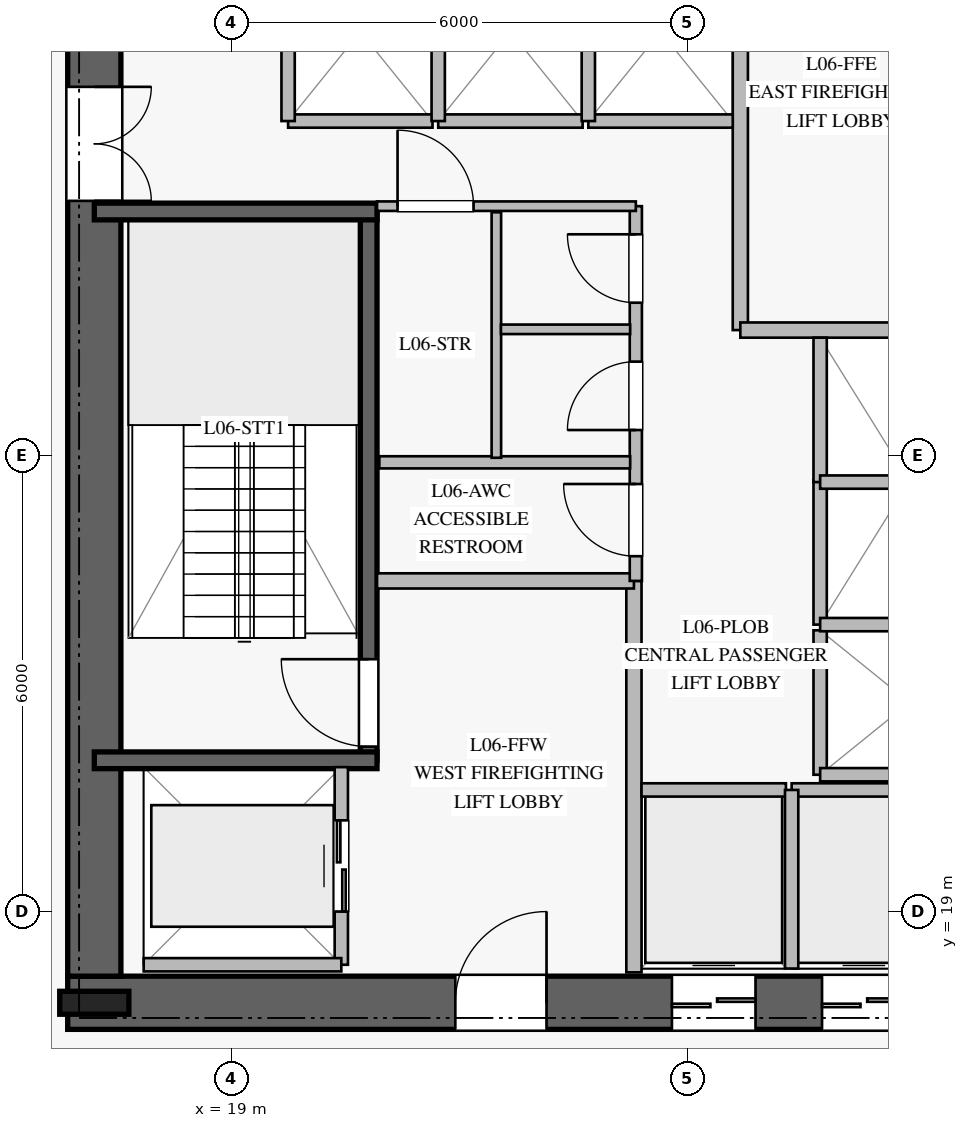
"""IFC4 building model, lengths in metres.
Left out: names, types, materials, properties, quantities, classifications, styles, units other than length and angle.
Written with IfcOpenShell. Run it as: python <this file> out.ifc"""

import sys

from ifc_helpers import new_model, si_unit, direction, frame, frame_2d, origin, origin_2d, place, context, subcontext, project, spatial, rectangle, i_section, extrude, element, fill, save


model = new_model("IFC4")
c1 = context("Model", 3, precision=1e-05, world=origin(), true_north=direction((0.0, 1.0)))
c2 = subcontext(c1, "Body", "Model", "MODEL_VIEW")
j1 = project(units=[si_unit("LENGTHUNIT", "METRE"), si_unit("PLANEANGLEUNIT", "RADIAN")], contexts=[c1])
p1 = place(None, origin())
s1 = spatial("IfcSite", under=j1, at=p1, CompositionType="ELEMENT")
p2 = place(p1, origin())
s2 = spatial("IfcBuilding", under=s1, at=p2, CompositionType="ELEMENT")
p3 = place(p2, frame((0.0, 0.0, 28.0)))
s3 = spatial("IfcBuildingStorey", under=s2, at=p3, CompositionType="ELEMENT", Elevation=28.0)
p4 = place(p3, frame((16.85, 17.8, 0.0), z_axis=(0.0, 0.0, 1.0), x_axis=(1.0, 0.0, 0.0)))
e1 = element("IfcWall", 1, at=p4, inside=s3, PredefinedType="SHEAR", context=c2, shape_type="SweptSolid", body=[
    extrude(rectangle(XDim=16.3, YDim=0.7, at=frame_2d((8.15, 0.0))), origin(), (0.0, 0.0, 1.0), 3.76),
])
p5 = place(p4, frame((5.1, 0.0, 0.0)))
e2 = element("IfcOpeningElement", 2, at=p5, cuts=e1, PredefinedType="OPENING", context=c2, shape_type="SweptSolid", body=[
    extrude(rectangle(XDim=1.2, YDim=2.25, at=frame_2d((0.6, 1.125))), frame((0.0, 0.36, 0.0), z_axis=(0.0, -1.0, 0.0), x_axis=(1.0, 0.0, 0.0)), (0.0, 0.0, 1.0), 0.72),
])
p6 = place(p4, frame((14.05, 0.0, 0.0)))
e3 = element("IfcOpeningElement", 3, at=p6, cuts=e1, PredefinedType="OPENING", context=c2, shape_type="SweptSolid", body=[
    extrude(rectangle(XDim=0.9, YDim=2.1, at=frame_2d((0.45, 1.05))), frame((0.0, 0.36, 0.0), z_axis=(0.0, -1.0, 0.0), x_axis=(1.0, 0.0, 0.0)), (0.0, 0.0, 1.0), 0.72),
])
p7 = place(p4, frame((7.95, 0.0, 0.0)))
e4 = element("IfcOpeningElement", 4, at=p7, cuts=e1, PredefinedType="OPENING", context=c2, shape_type="SweptSolid", body=[
    extrude(rectangle(XDim=1.1, YDim=2.2, at=frame_2d((0.55, 1.1))), frame((0.0, 0.36, 0.0), z_axis=(0.0, -1.0, 0.0), x_axis=(1.0, 0.0, 0.0)), (0.0, 0.0, 1.0), 0.72),
])
p8 = place(p4, frame((9.925, 0.0, 0.0)))
e5 = element("IfcOpeningElement", 5, at=p8, cuts=e1, PredefinedType="OPENING", context=c2, shape_type="SweptSolid", body=[
    extrude(rectangle(XDim=1.1, YDim=2.2, at=frame_2d((0.55, 1.1))), frame((0.0, 0.36, 0.0), z_axis=(0.0, -1.0, 0.0), x_axis=(1.0, 0.0, 0.0)), (0.0, 0.0, 1.0), 0.72),
])
p9 = place(p4, frame((11.9, 0.0, 0.0)))
e6 = element("IfcOpeningElement", 6, at=p9, cuts=e1, PredefinedType="OPENING", context=c2, shape_type="SweptSolid", body=[
    extrude(rectangle(XDim=1.1, YDim=2.2, at=frame_2d((0.55, 1.1))), frame((0.0, 0.36, 0.0), z_axis=(0.0, -1.0, 0.0), x_axis=(1.0, 0.0, 0.0)), (0.0, 0.0, 1.0), 0.72),
])
p10 = place(p3, frame((17.2, 31.85, 0.0), z_axis=(0.0, 0.0, 1.0), x_axis=(0.0, -1.0, 0.0)))
e7 = element("IfcWall", 7, at=p10, inside=s3, PredefinedType="SHEAR", context=c2, shape_type="SweptSolid", body=[
    extrude(rectangle(XDim=13.7, YDim=0.7, at=frame_2d((6.85, 0.0))), origin(), (0.0, 0.0, 1.0), 3.76),
])
p11 = place(p10, frame((2.0, 0.0, 0.0)))
e8 = element("IfcOpeningElement", 8, at=p11, cuts=e7, PredefinedType="OPENING", context=c2, shape_type="SweptSolid", body=[
    extrude(rectangle(XDim=1.5, YDim=2.2, at=frame_2d((0.75, 1.1))), frame((0.0, 0.36, 0.0), z_axis=(0.0, -1.0, 0.0), x_axis=(1.0, 0.0, 0.0)), (0.0, 0.0, 1.0), 0.72),
])
p12 = place(p3, frame((17.2, 17.8, 0.0), z_axis=(0.0, 0.0, 1.0), x_axis=(1.0, 0.0, 0.0)))
e9 = element("IfcColumn", 9, at=p12, inside=s3, PredefinedType="COLUMN", context=c2, shape_type="SweptSolid", body=[
    extrude(i_section(OverallWidth=0.302, OverallDepth=0.91, WebThickness=0.021, FlangeThickness=0.04, at=origin_2d()), origin(), (0.0, 0.0, 1.0), 4.0),
])
p13 = place(p3, frame((20.81, 20.99, 0.0), z_axis=(0.0, 0.0, 1.0), x_axis=(0.0, 1.0, 0.0)))
e10 = element("IfcWall", 10, at=p13, inside=s3, PredefinedType="SOLIDWALL", context=c2, shape_type="SweptSolid", body=[
    extrude(rectangle(XDim=7.22, YDim=0.22, at=frame_2d((3.61, 0.0))), origin(), (0.0, 0.0, 1.0), 3.76),
])
p14 = place(p13, frame((0.18, 0.0, 0.0)))
e11 = element("IfcOpeningElement", 11, at=p14, cuts=e10, PredefinedType="OPENING", context=c2, shape_type="SweptSolid", body=[
    extrude(rectangle(XDim=1.15, YDim=2.2, at=frame_2d((0.575, 1.1))), frame((0.0, 0.12, 0.0), z_axis=(0.0, -1.0, 0.0), x_axis=(1.0, 0.0, 0.0)), (0.0, 0.0, 1.0), 0.24),
])
for number, where, z_axis, x_axis in (
    (12, (17.2, 20.99, 0.0), (0.0, 0.0, 1.0), (1.0, 0.0, 0.0)),
    (13, (17.2, 28.21, 0.0), (0.0, 0.0, 1.0), (1.0, 0.0, 0.0)),
):
    element("IfcWall", number, at=place(p3, frame(where, z_axis=z_axis, x_axis=x_axis)), inside=s3, PredefinedType="SOLIDWALL", context=c2, shape_type="SweptSolid", body=[
        extrude(rectangle(XDim=3.72, YDim=0.22, at=frame_2d((1.86, 0.0))), origin(), (0.0, 0.0, 1.0), 3.76),
    ])
p15 = place(p3, frame((24.3, 18.2, 0.0), z_axis=(0.0, 0.0, 1.0), x_axis=(0.0, 1.0, 0.0)))
e14 = element("IfcWall", 14, at=p15, inside=s3, PredefinedType="PARTITIONING", context=c2, shape_type="SweptSolid", body=[
    extrude(rectangle(XDim=5.15, YDim=0.2, at=frame_2d((2.575, 0.0))), origin(), (0.0, 0.0, 1.0), 3.76),
])
p16 = place(p3, frame((20.92, 23.35, 0.0), z_axis=(0.0, 0.0, 1.0), x_axis=(1.0, 0.0, 0.0)))
e15 = element("IfcWall", 15, at=p16, inside=s3, PredefinedType="PARTITIONING", context=c2, shape_type="SweptSolid", body=[
    extrude(rectangle(XDim=3.38, YDim=0.2, at=frame_2d((1.69, 0.0))), origin(), (0.0, 0.0, 1.0), 3.76),
])
p17 = place(p3, frame((25.7, 26.65, 0.0), z_axis=(0.0, 0.0, 1.0), x_axis=(0.0, 1.0, 0.0)))
e16 = element("IfcWall", 16, at=p17, inside=s3, PredefinedType="PARTITIONING", context=c2, shape_type="SweptSolid", body=[
    extrude(rectangle(XDim=5.15, YDim=0.2, at=frame_2d((2.575, 0.0))), origin(), (0.0, 0.0, 1.0), 3.76),
])
p18 = place(p3, frame((25.7, 26.65, 0.0), z_axis=(0.0, 0.0, 1.0), x_axis=(1.0, 0.0, 0.0)))
e17 = element("IfcWall", 17, at=p18, inside=s3, PredefinedType="PARTITIONING", context=c2, shape_type="SweptSolid", body=[
    extrude(rectangle(XDim=3.38, YDim=0.2, at=frame_2d((1.69, 0.0))), origin(), (0.0, 0.0, 1.0), 3.76),
])
p19 = place(p3, frame((24.325, 23.35, 0.0), z_axis=(0.0, 0.0, 1.0), x_axis=(0.0, 1.0, 0.0)))
e18 = element("IfcWall", 18, at=p19, inside=s3, PredefinedType="PLUMBINGWALL", context=c2, shape_type="SweptSolid", body=[
    extrude(rectangle(XDim=4.93, YDim=0.16, at=frame_2d((2.465, 0.0))), origin(), (0.0, 0.0, 1.0), 3.76),
])
p20 = place(p19, frame((0.325, 0.0, 0.0)))
e19 = element("IfcOpeningElement", 19, at=p20, cuts=e18, PredefinedType="OPENING", context=c2, shape_type="SweptSolid", body=[
    extrude(rectangle(XDim=0.95, YDim=2.1, at=frame_2d((0.475, 1.05))), frame((0.0, 0.09, 0.0), z_axis=(0.0, -1.0, 0.0), x_axis=(1.0, 0.0, 0.0)), (0.0, 0.0, 1.0), 0.18),
])
p21 = place(p19, frame((1.985, 0.0, 0.0)))
e20 = element("IfcOpeningElement", 20, at=p21, cuts=e18, PredefinedType="OPENING", context=c2, shape_type="SweptSolid", body=[
    extrude(rectangle(XDim=0.9, YDim=2.1, at=frame_2d((0.45, 1.05))), frame((0.0, 0.09, 0.0), z_axis=(0.0, -1.0, 0.0), x_axis=(1.0, 0.0, 0.0)), (0.0, 0.0, 1.0), 0.18),
])
p22 = place(p19, frame((3.66, 0.0, 0.0)))
e21 = element("IfcOpeningElement", 21, at=p22, cuts=e18, PredefinedType="OPENING", context=c2, shape_type="SweptSolid", body=[
    extrude(rectangle(XDim=0.9, YDim=2.1, at=frame_2d((0.45, 1.05))), frame((0.0, 0.09, 0.0), z_axis=(0.0, -1.0, 0.0), x_axis=(1.0, 0.0, 0.0)), (0.0, 0.0, 1.0), 0.18),
])
p23 = place(p3, frame((20.92, 28.28, 0.0), z_axis=(0.0, 0.0, 1.0), x_axis=(1.0, 0.0, 0.0)))
e22 = element("IfcWall", 22, at=p23, inside=s3, PredefinedType="PARTITIONING", context=c2, shape_type="SweptSolid", body=[
    extrude(rectangle(XDim=3.405, YDim=0.125, at=frame_2d((1.703, 0.0))), origin(), (0.0, 0.0, 1.0), 3.76),
])
p24 = place(p23, frame((0.27, 0.0, 0.0)))
e23 = element("IfcOpeningElement", 23, at=p24, cuts=e22, PredefinedType="OPENING", context=c2, shape_type="SweptSolid", body=[
    extrude(rectangle(XDim=1.0, YDim=2.15, at=frame_2d((0.5, 1.075))), frame((0.0, 0.073, 0.0), z_axis=(0.0, -1.0, 0.0), x_axis=(1.0, 0.0, 0.0)), (0.0, 0.0, 1.0), 0.145),
])
p25 = place(p3, frame((20.95, 24.91, 0.0), z_axis=(0.0, 0.0, 1.0), x_axis=(1.0, 0.0, 0.0)))
e24 = element("IfcWall", 24, at=p25, inside=s3, PredefinedType="PLUMBINGWALL", context=c2, shape_type="SweptSolid", body=[
    extrude(rectangle(XDim=3.3, YDim=0.16, at=frame_2d((1.65, 0.0))), origin(), (0.0, 0.0, 1.0), 3.76),
])
p26 = place(p3, frame((22.49, 24.97, 0.0), z_axis=(0.0, 0.0, 1.0), x_axis=(0.0, 1.0, 0.0)))
e25 = element("IfcWall", 25, at=p26, inside=s3, PredefinedType="PARTITIONING", context=c2, shape_type="SweptSolid", body=[
    extrude(rectangle(XDim=3.23, YDim=0.125, at=frame_2d((1.615, 0.0))), origin(), (0.0, 0.0, 1.0), 3.76),
])
p27 = place(p3, frame((22.55, 26.66, 0.0), z_axis=(0.0, 0.0, 1.0), x_axis=(1.0, 0.0, 0.0)))
e26 = element("IfcWall", 26, at=p27, inside=s3, PredefinedType="PARTITIONING", context=c2, shape_type="SweptSolid", body=[
    extrude(rectangle(XDim=1.7, YDim=0.125, at=frame_2d((0.85, 0.0))), origin(), (0.0, 0.0, 1.0), 3.76),
])
p28 = place(p3, frame((24.4, 20.6, 0.0), z_axis=(0.0, 0.0, 1.0), x_axis=(1.0, 0.0, 0.0)))
e27 = element("IfcWall", 27, at=p28, inside=s3, PredefinedType="PARTITIONING", context=c2, shape_type="SweptSolid", body=[
    extrude(rectangle(XDim=1.9, YDim=0.175, at=frame_2d((0.95, 0.0))), origin(), (0.0, 0.0, 1.0), 3.76),
])
p29 = place(p3, frame((26.375, 20.6, 0.0), z_axis=(0.0, 0.0, 1.0), x_axis=(1.0, 0.0, 0.0)))
e28 = element("IfcWall", 28, at=p29, inside=s3, PredefinedType="PARTITIONING", context=c2, shape_type="SweptSolid", body=[
    extrude(rectangle(XDim=1.9, YDim=0.175, at=frame_2d((0.95, 0.0))), origin(), (0.0, 0.0, 1.0), 3.76),
])
p30 = place(p3, frame((26.375, 18.25, 0.0), z_axis=(0.0, 0.0, 1.0), x_axis=(0.0, 1.0, 0.0)))
e29 = element("IfcWall", 29, at=p30, inside=s3, PredefinedType="PARTITIONING", context=c2, shape_type="SweptSolid", body=[
    extrude(rectangle(XDim=2.35, YDim=0.175, at=frame_2d((1.175, 0.0))), origin(), (0.0, 0.0, 1.0), 3.76),
])
p31 = place(p3, frame((19.75, 29.4, 0.0), z_axis=(0.0, 0.0, 1.0), x_axis=(1.0, 0.0, 0.0)))
e30 = element("IfcWall", 30, at=p31, inside=s3, PredefinedType="PARTITIONING", context=c2, shape_type="SweptSolid", body=[
    extrude(rectangle(XDim=1.9, YDim=0.175, at=frame_2d((0.95, 0.0))), origin(), (0.0, 0.0, 1.0), 3.76),
])
p32 = place(p3, frame((19.75, 29.4, 0.0), z_axis=(0.0, 0.0, 1.0), x_axis=(0.0, 1.0, 0.0)))
e31 = element("IfcWall", 31, at=p32, inside=s3, PredefinedType="PARTITIONING", context=c2, shape_type="SweptSolid", body=[
    extrude(rectangle(XDim=2.35, YDim=0.175, at=frame_2d((1.175, 0.0))), origin(), (0.0, 0.0, 1.0), 3.76),
])
p33 = place(p3, frame((21.725, 29.4, 0.0), z_axis=(0.0, 0.0, 1.0), x_axis=(1.0, 0.0, 0.0)))
e32 = element("IfcWall", 32, at=p33, inside=s3, PredefinedType="PARTITIONING", context=c2, shape_type="SweptSolid", body=[
    extrude(rectangle(XDim=1.9, YDim=0.175, at=frame_2d((0.95, 0.0))), origin(), (0.0, 0.0, 1.0), 3.76),
])
p34 = place(p3, frame((21.725, 29.4, 0.0), z_axis=(0.0, 0.0, 1.0), x_axis=(0.0, 1.0, 0.0)))
e33 = element("IfcWall", 33, at=p34, inside=s3, PredefinedType="PARTITIONING", context=c2, shape_type="SweptSolid", body=[
    extrude(rectangle(XDim=2.35, YDim=0.175, at=frame_2d((1.175, 0.0))), origin(), (0.0, 0.0, 1.0), 3.76),
])
p35 = place(p3, frame((23.7, 29.4, 0.0), z_axis=(0.0, 0.0, 1.0), x_axis=(1.0, 0.0, 0.0)))
e34 = element("IfcWall", 34, at=p35, inside=s3, PredefinedType="PARTITIONING", context=c2, shape_type="SweptSolid", body=[
    extrude(rectangle(XDim=1.9, YDim=0.175, at=frame_2d((0.95, 0.0))), origin(), (0.0, 0.0, 1.0), 3.76),
])
p36 = place(p3, frame((23.7, 29.4, 0.0), z_axis=(0.0, 0.0, 1.0), x_axis=(0.0, 1.0, 0.0)))
e35 = element("IfcWall", 35, at=p36, inside=s3, PredefinedType="PARTITIONING", context=c2, shape_type="SweptSolid", body=[
    extrude(rectangle(XDim=2.35, YDim=0.175, at=frame_2d((1.175, 0.0))), origin(), (0.0, 0.0, 1.0), 3.76),
])
p37 = place(p3, frame((26.75, 20.8, 0.0), z_axis=(0.0, 0.0, 1.0), x_axis=(0.0, 1.0, 0.0)))
e36 = element("IfcWall", 36, at=p37, inside=s3, PredefinedType="PARTITIONING", context=c2, shape_type="SweptSolid", body=[
    extrude(rectangle(XDim=1.9, YDim=0.175, at=frame_2d((0.95, 0.0))), origin(), (0.0, 0.0, 1.0), 3.76),
])
p38 = place(p3, frame((26.75, 20.8, 0.0), z_axis=(0.0, 0.0, 1.0), x_axis=(1.0, 0.0, 0.0)))
e37 = element("IfcWall", 37, at=p38, inside=s3, PredefinedType="PARTITIONING", context=c2, shape_type="SweptSolid", body=[
    extrude(rectangle(XDim=2.35, YDim=0.175, at=frame_2d((1.175, 0.0))), origin(), (0.0, 0.0, 1.0), 3.76),
])
p39 = place(p3, frame((26.75, 22.775, 0.0), z_axis=(0.0, 0.0, 1.0), x_axis=(0.0, 1.0, 0.0)))
e38 = element("IfcWall", 38, at=p39, inside=s3, PredefinedType="PARTITIONING", context=c2, shape_type="SweptSolid", body=[
    extrude(rectangle(XDim=1.9, YDim=0.175, at=frame_2d((0.95, 0.0))), origin(), (0.0, 0.0, 1.0), 3.76),
])
p40 = place(p3, frame((26.75, 22.775, 0.0), z_axis=(0.0, 0.0, 1.0), x_axis=(1.0, 0.0, 0.0)))
e39 = element("IfcWall", 39, at=p40, inside=s3, PredefinedType="PARTITIONING", context=c2, shape_type="SweptSolid", body=[
    extrude(rectangle(XDim=2.35, YDim=0.175, at=frame_2d((1.175, 0.0))), origin(), (0.0, 0.0, 1.0), 3.76),
])
p41 = place(p3, frame((26.75, 24.65, 0.0), z_axis=(0.0, 0.0, 1.0), x_axis=(0.0, 1.0, 0.0)))
e40 = element("IfcWall", 40, at=p41, inside=s3, PredefinedType="PARTITIONING", context=c2, shape_type="SweptSolid", body=[
    extrude(rectangle(XDim=1.9, YDim=0.175, at=frame_2d((0.95, 0.0))), origin(), (0.0, 0.0, 1.0), 3.76),
])
p42 = place(p3, frame((26.75, 24.65, 0.0), z_axis=(0.0, 0.0, 1.0), x_axis=(1.0, 0.0, 0.0)))
e41 = element("IfcWall", 41, at=p42, inside=s3, PredefinedType="PARTITIONING", context=c2, shape_type="SweptSolid", body=[
    extrude(rectangle(XDim=2.35, YDim=0.175, at=frame_2d((1.175, 0.0))), origin(), (0.0, 0.0, 1.0), 3.76),
])
p43 = place(p3, frame((20.45, 18.3, 0.0), z_axis=(0.0, 0.0, 1.0), x_axis=(0.0, 1.0, 0.0)))
e42 = element("IfcWall", 42, at=p43, inside=s3, PredefinedType="PARTITIONING", context=c2, shape_type="SweptSolid", body=[
    extrude(rectangle(XDim=2.6, YDim=0.175, at=frame_2d((1.3, 0.0))), origin(), (0.0, 0.0, 1.0), 3.76),
])
p44 = place(p43, frame((0.7, 0.0, 0.0)))
e43 = element("IfcOpeningElement", 43, at=p44, cuts=e42, PredefinedType="OPENING", context=c2, shape_type="SweptSolid", body=[
    extrude(rectangle(XDim=1.2, YDim=2.2, at=frame_2d((0.6, 1.1))), frame((0.0, 0.098, 0.0), z_axis=(0.0, -1.0, 0.0), x_axis=(1.0, 0.0, 0.0)), (0.0, 0.0, 1.0), 0.195),
])
p45 = place(p3, frame((17.85, 18.3, 0.0), z_axis=(0.0, 0.0, 1.0), x_axis=(1.0, 0.0, 0.0)))
e44 = element("IfcWall", 44, at=p45, inside=s3, PredefinedType="PARTITIONING", context=c2, shape_type="SweptSolid", body=[
    extrude(rectangle(XDim=2.6, YDim=0.175, at=frame_2d((1.3, 0.0))), origin(), (0.0, 0.0, 1.0), 3.76),
])
p46 = place(p3, frame((7.766, 18.98, 0.0), z_axis=(0.0, 0.0, 1.0), x_axis=(0.83545815699, -0.549554062781, 0.0)))
e45 = element("IfcWall", 45, at=p46, inside=s3, PredefinedType="PARTITIONING", context=c2, shape_type="SweptSolid", body=[
    extrude(rectangle(XDim=17.092, YDim=0.125, at=frame_2d((8.546, 0.0))), origin(), (0.0, 0.0, 1.0), 3.05),
])
p47 = place(p46, frame((8.046, 0.0, 0.0)))
e46 = element("IfcOpeningElement", 46, at=p47, cuts=e45, PredefinedType="OPENING", context=c2, shape_type="SweptSolid", body=[
    extrude(rectangle(XDim=1.0, YDim=2.15, at=frame_2d((0.5, 1.075))), frame((0.0, 0.073, 0.0), z_axis=(0.0, -1.0, 0.0), x_axis=(1.0, 0.0, 0.0)), (0.0, 0.0, 1.0), 0.145),
])
p48 = place(p14, origin())
e47 = element("IfcDoor", 47, at=p48, inside=s3, OperationType="SINGLE_SWING_RIGHT", PredefinedType="DOOR", context=c2, shape_type="SweptSolid", body=[
    extrude(rectangle(XDim=1.15, YDim=2.2, at=frame_2d((0.575, 1.1))), frame((0.0, 0.025, 0.0), z_axis=(0.0, -1.0, 0.0), x_axis=(1.0, 0.0, 0.0)), (0.0, 0.0, 1.0), 0.05),
])
fill(e11, e47)
p49 = place(p5, origin())
e48 = element("IfcDoor", 48, at=p49, inside=s3, OperationType="SINGLE_SWING_RIGHT", PredefinedType="DOOR", context=c2, shape_type="SweptSolid", body=[
    extrude(rectangle(XDim=1.2, YDim=2.25, at=frame_2d((0.6, 1.125))), frame((0.0, 0.025, 0.0), z_axis=(0.0, -1.0, 0.0), x_axis=(1.0, 0.0, 0.0)), (0.0, 0.0, 1.0), 0.05),
])
fill(e2, e48)
p50 = place(p11, origin())
e49 = element("IfcDoor", 49, at=p50, inside=s3, OperationType="DOUBLE_DOOR_SINGLE_SWING", PredefinedType="DOOR", context=c2, shape_type="SweptSolid", body=[
    extrude(rectangle(XDim=1.5, YDim=2.2, at=frame_2d((0.75, 1.1))), frame((0.0, 0.025, 0.0), z_axis=(0.0, -1.0, 0.0), x_axis=(1.0, 0.0, 0.0)), (0.0, 0.0, 1.0), 0.05),
])
fill(e8, e49)
p51 = place(p20, origin())
e50 = element("IfcDoor", 50, at=p51, inside=s3, OperationType="SINGLE_SWING_RIGHT", PredefinedType="DOOR", context=c2, shape_type="SweptSolid", body=[
    extrude(rectangle(XDim=0.95, YDim=2.1, at=frame_2d((0.475, 1.05))), frame((0.0, 0.025, 0.0), z_axis=(0.0, -1.0, 0.0), x_axis=(1.0, 0.0, 0.0)), (0.0, 0.0, 1.0), 0.05),
])
fill(e19, e50)
p52 = place(p21, origin())
e51 = element("IfcDoor", 51, at=p52, inside=s3, OperationType="SINGLE_SWING_LEFT", PredefinedType="DOOR", context=c2, shape_type="SweptSolid", body=[
    extrude(rectangle(XDim=0.9, YDim=2.1, at=frame_2d((0.45, 1.05))), frame((0.0, 0.025, 0.0), z_axis=(0.0, -1.0, 0.0), x_axis=(1.0, 0.0, 0.0)), (0.0, 0.0, 1.0), 0.05),
])
fill(e20, e51)
p53 = place(p22, origin())
e52 = element("IfcDoor", 52, at=p53, inside=s3, OperationType="SINGLE_SWING_RIGHT", PredefinedType="DOOR", context=c2, shape_type="SweptSolid", body=[
    extrude(rectangle(XDim=0.9, YDim=2.1, at=frame_2d((0.45, 1.05))), frame((0.0, 0.025, 0.0), z_axis=(0.0, -1.0, 0.0), x_axis=(1.0, 0.0, 0.0)), (0.0, 0.0, 1.0), 0.05),
])
fill(e21, e52)
p54 = place(p24, origin())
e53 = element("IfcDoor", 53, at=p54, inside=s3, OperationType="SINGLE_SWING_LEFT", PredefinedType="DOOR", context=c2, shape_type="SweptSolid", body=[
    extrude(rectangle(XDim=1.0, YDim=2.15, at=frame_2d((0.5, 1.075))), frame((0.0, 0.025, 0.0), z_axis=(0.0, -1.0, 0.0), x_axis=(1.0, 0.0, 0.0)), (0.0, 0.0, 1.0), 0.05),
])
fill(e23, e53)
p55 = place(p7, origin())
e54 = element("IfcDoor", 54, at=p55, inside=s3, OperationType="DOUBLE_DOOR_SLIDING", PredefinedType="DOOR", context=c2, shape_type="SweptSolid", body=[
    extrude(rectangle(XDim=1.1, YDim=2.2, at=frame_2d((0.55, 1.1))), frame((0.0, 0.025, 0.0), z_axis=(0.0, -1.0, 0.0), x_axis=(1.0, 0.0, 0.0)), (0.0, 0.0, 1.0), 0.05),
])
fill(e4, e54)
p56 = place(p8, origin())
e55 = element("IfcDoor", 55, at=p56, inside=s3, OperationType="DOUBLE_DOOR_SLIDING", PredefinedType="DOOR", context=c2, shape_type="SweptSolid", body=[
    extrude(rectangle(XDim=1.1, YDim=2.2, at=frame_2d((0.55, 1.1))), frame((0.0, 0.025, 0.0), z_axis=(0.0, -1.0, 0.0), x_axis=(1.0, 0.0, 0.0)), (0.0, 0.0, 1.0), 0.05),
])
fill(e5, e55)
p57 = place(p44, origin())
e56 = element("IfcDoor", 56, at=p57, inside=s3, OperationType="DOUBLE_DOOR_SLIDING", PredefinedType="DOOR", context=c2, shape_type="SweptSolid", body=[
    extrude(rectangle(XDim=1.2, YDim=2.2, at=frame_2d((0.6, 1.1))), frame((0.0, 0.025, 0.0), z_axis=(0.0, -1.0, 0.0), x_axis=(1.0, 0.0, 0.0)), (0.0, 0.0, 1.0), 0.05),
])
fill(e43, e56)
save(model, sys.argv[1])
